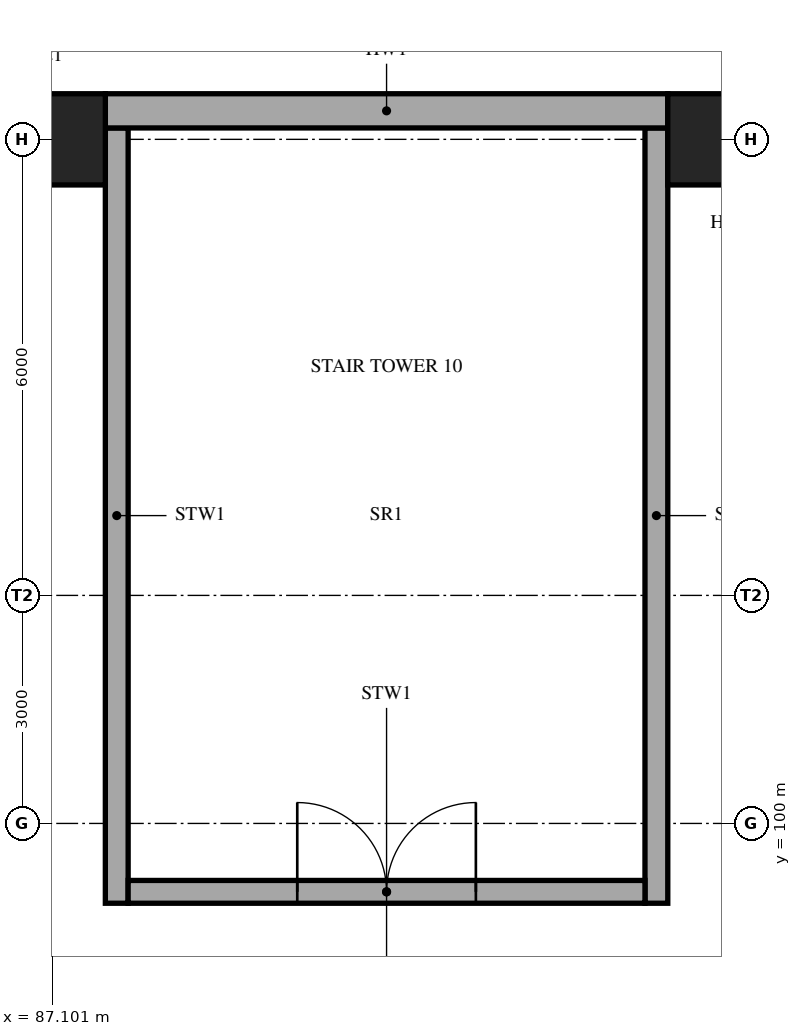
"""IFC4 building model, lengths in metres.
Left out: names, types, materials, properties, quantities, classifications, styles, units other than length and angle.
Written with IfcOpenShell. Run it as: python <this file> out.ifc"""

import sys

from ifc_helpers import new_model, si_unit, direction, frame, frame_2d, origin, origin_2d, place, context, subcontext, project, spatial, rectangle, extrude, element, fill, save


model = new_model("IFC4")
c1 = context("Model", 3, precision=1e-05, world=origin(), true_north=direction((0.0, 1.0)))
c2 = subcontext(c1, "Body", "Model", "MODEL_VIEW")
j1 = project(units=[si_unit("LENGTHUNIT", "METRE"), si_unit("PLANEANGLEUNIT", "RADIAN")], contexts=[c1])
p1 = place(None, origin())
s1 = spatial("IfcSite", under=j1, at=p1, CompositionType="ELEMENT")
p2 = place(p1, origin())
s2 = spatial("IfcBuilding", under=s1, at=p2, CompositionType="ELEMENT")
p3 = place(p2, frame((0.0, 0.0, 15.0)))
s3 = spatial("IfcBuildingStorey", under=s2, at=p3, CompositionType="ELEMENT", Elevation=15.0)
for number, where, z_axis, x_axis in (
    (1, (87.0, 109.0, 0.0), (0.0, 0.0, 1.0), (1.0, 0.0, 0.0)),
    (2, (96.0, 109.0, 0.0), (0.0, 0.0, 1.0), (1.0, 0.0, 0.0)),
):
    element("IfcColumn", number, at=place(p3, frame(where, z_axis=z_axis, x_axis=x_axis)), inside=s3, PredefinedType="COLUMN", context=c2, shape_type="SweptSolid", body=[
        extrude(rectangle(XDim=1.6, YDim=1.2, at=origin_2d()), origin(), (0.0, 0.0, 1.0), 4.2),
    ])
for number, where, z_axis, x_axis in (
    (3, (87.95, 109.15, 0.0), (0.0, 0.0, 1.0), (0.0, -1.0, 0.0)),
    (4, (95.05, 109.15, 0.0), (0.0, 0.0, 1.0), (0.0, -1.0, 0.0)),
):
    element("IfcWall", number, at=place(p3, frame(where, z_axis=z_axis, x_axis=x_axis)), inside=s3, PredefinedType="SHEAR", context=c2, shape_type="SweptSolid", body=[
        extrude(rectangle(XDim=10.2, YDim=0.3, at=frame_2d((5.1, 0.0))), origin(), (0.0, 0.0, 1.0), 3.9),
    ])
p4 = place(p3, frame((88.1, 99.1, 0.0), z_axis=(0.0, 0.0, 1.0), x_axis=(1.0, 0.0, 0.0)))
e5 = element("IfcWall", 5, at=p4, inside=s3, PredefinedType="SHEAR", context=c2, shape_type="SweptSolid", body=[
    extrude(rectangle(XDim=6.8, YDim=0.3, at=frame_2d((3.4, 0.0))), origin(), (0.0, 0.0, 1.0), 3.9),
])
p5 = place(p4, frame((2.225, 0.0, 0.0)))
e6 = element("IfcOpeningElement", 6, at=p5, cuts=e5, PredefinedType="OPENING", context=c2, shape_type="SweptSolid", body=[
    extrude(rectangle(XDim=2.35, YDim=2.1, at=frame_2d((1.175, 1.05))), frame((0.0, 0.16, 0.0), z_axis=(0.0, -1.0, 0.0), x_axis=(1.0, 0.0, 0.0)), (0.0, 0.0, 1.0), 0.32),
])
p6 = place(p3, frame((87.8, 109.375, 0.0), z_axis=(0.0, 0.0, 1.0), x_axis=(1.0, 0.0, 0.0)))
e7 = element("IfcWall", 7, at=p6, inside=s3, PredefinedType="SOLIDWALL", context=c2, shape_type="SweptSolid", body=[
    extrude(rectangle(XDim=7.4, YDim=0.45, at=frame_2d((3.7, 0.0))), origin(), (0.0, 0.0, 1.0), 4.2),
])
p7 = place(p5, origin())
e8 = element("IfcDoor", 8, at=p7, inside=s3, OperationType="DOUBLE_DOOR_SINGLE_SWING", PredefinedType="DOOR", context=c2, shape_type="SweptSolid", body=[
    extrude(rectangle(XDim=2.35, YDim=2.1, at=frame_2d((1.175, 1.05))), frame((0.0, 0.025, 0.0), z_axis=(0.0, -1.0, 0.0), x_axis=(1.0, 0.0, 0.0)), (0.0, 0.0, 1.0), 0.05),
])
fill(e6, e8)
save(model, sys.argv[1])
